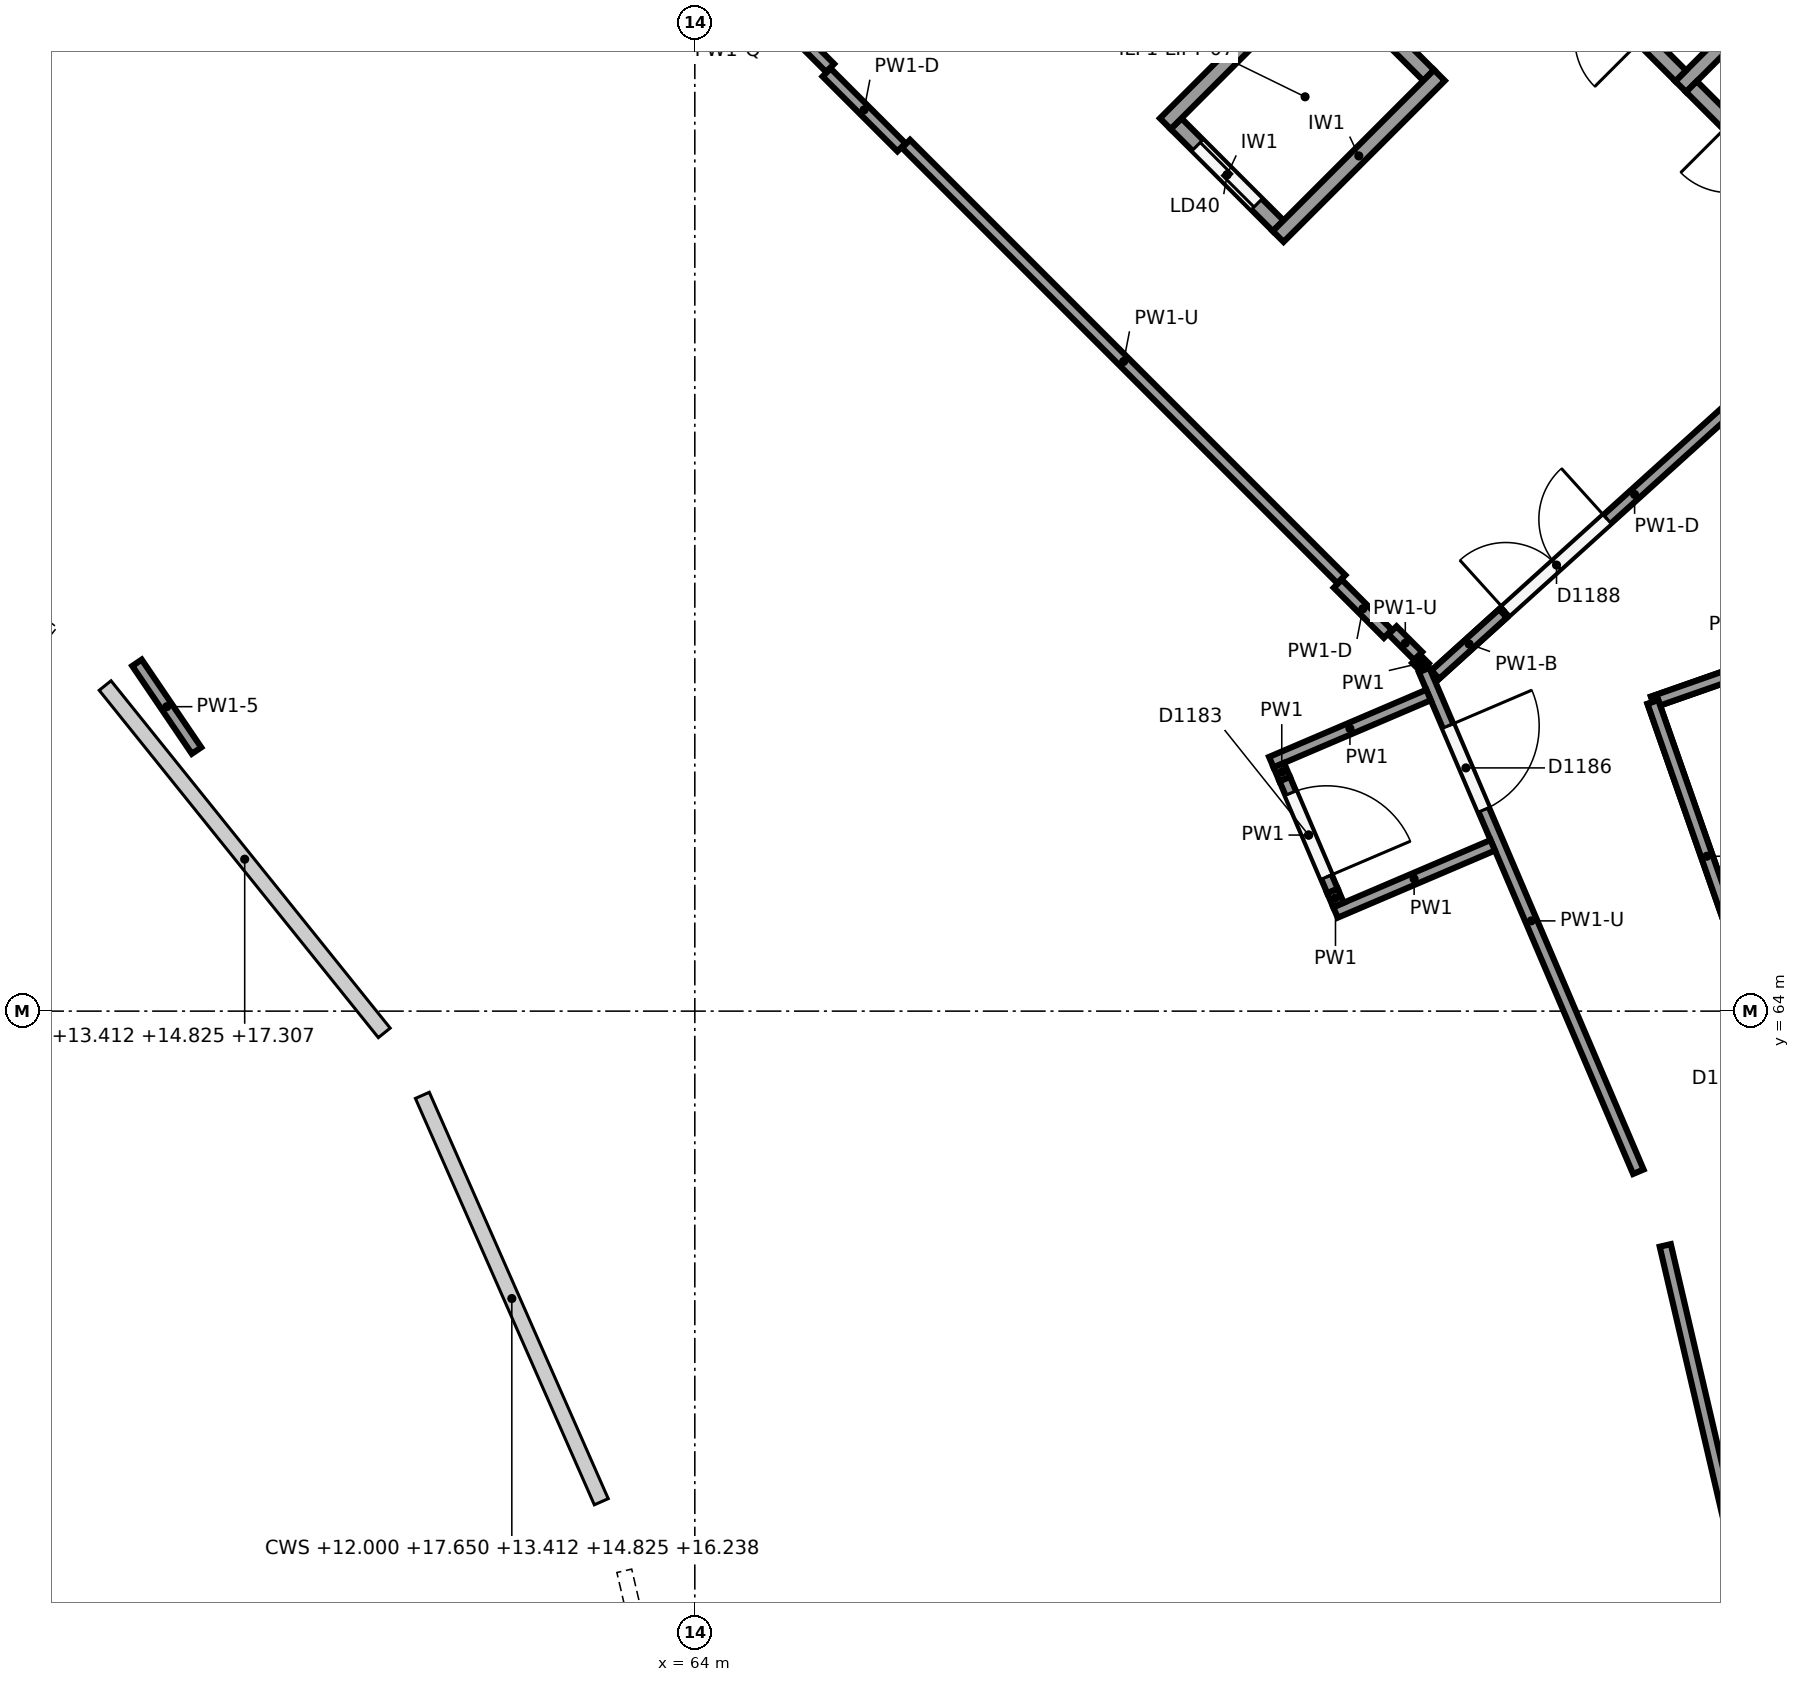
"""IFC4 building model, lengths in metres.
Left out: names, types, materials, properties, quantities, classifications, styles, units other than length and angle.
Written with IfcOpenShell. Run it as: python <this file> out.ifc"""

import sys

from ifc_helpers import new_model, si_unit, direction, frame, frame_2d, origin, origin_2d, place, context, subcontext, project, spatial, rectangle, circle, extrude, element, fill, save


model = new_model("IFC4")
c1 = context("Model", 3, precision=1e-05, world=origin(), true_north=direction((0.0, 1.0)))
c2 = subcontext(c1, "Body", "Model", "MODEL_VIEW")
j1 = project(units=[si_unit("LENGTHUNIT", "METRE"), si_unit("PLANEANGLEUNIT", "RADIAN")], contexts=[c1])
p1 = place(None, origin())
s1 = spatial("IfcSite", under=j1, at=p1, CompositionType="ELEMENT")
p2 = place(p1, origin())
s2 = spatial("IfcBuilding", under=s1, at=p2, CompositionType="ELEMENT")
p3 = place(p2, frame((0.0, 0.0, 12.0)))
s3 = spatial("IfcBuildingStorey", under=s2, at=p3, CompositionType="ELEMENT", Elevation=12.0)
p4 = place(p3, frame((61.723, 56.716, 0.0), z_axis=(0.0, 0.0, 1.0), x_axis=(1.0, 0.0, 0.0)))
e1 = element("IfcColumn", 1, at=p4, inside=s3, PredefinedType="COLUMN", context=c2, shape_type="SweptSolid", body=[
    extrude(circle(Radius=0.45, at=origin_2d()), origin(), (0.0, 0.0, 1.0), 2.877),
])
p5 = place(p3, frame((62.964, 57.104, 0.0), z_axis=(0.0, 0.0, 1.0), x_axis=(1.0, 0.0, 0.0)))
e2 = element("IfcColumn", 2, at=p5, inside=s3, PredefinedType="COLUMN", context=c2, shape_type="SweptSolid", body=[
    extrude(circle(Radius=0.4, at=origin_2d()), origin(), (0.0, 0.0, 1.0), 4.305),
])
p6 = place(p3, frame((71.17, 59.677, 0.0), z_axis=(0.0, 0.0, 1.0), x_axis=(1.0, 0.0, 0.0)))
e3 = element("IfcColumn", 3, at=p6, inside=s3, PredefinedType="COLUMN", context=c2, shape_type="SweptSolid", body=[
    extrude(circle(Radius=0.45, at=origin_2d()), origin(), (0.0, 0.0, 1.0), 6.0),
])
p7 = place(p3, frame((59.049, 62.766, 0.0), z_axis=(0.0, 0.0, 1.0), x_axis=(1.0, 0.0, 0.0)))
e4 = element("IfcColumn", 4, at=p7, inside=s3, PredefinedType="COLUMN", context=c2, shape_type="SweptSolid", body=[
    extrude(circle(Radius=0.45, at=origin_2d()), origin(), (0.0, 0.0, 1.0), 3.132),
])
p8 = place(p3, frame((60.222, 63.331, 0.0), z_axis=(0.0, 0.0, 1.0), x_axis=(1.0, 0.0, 0.0)))
e5 = element("IfcColumn", 5, at=p8, inside=s3, PredefinedType="COLUMN", context=c2, shape_type="SweptSolid", body=[
    extrude(circle(Radius=0.4, at=origin_2d()), origin(), (0.0, 0.0, 1.0), 4.561),
])
p9 = place(p3, frame((67.972, 67.058, 0.0), z_axis=(0.0, 0.0, 1.0), x_axis=(1.0, 0.0, 0.0)))
e6 = element("IfcColumn", 6, at=p9, inside=s3, PredefinedType="COLUMN", context=c2, shape_type="SweptSolid", body=[
    extrude(circle(Radius=0.45, at=origin_2d()), origin(), (0.0, 0.0, 1.0), 6.0),
])
p10 = place(p3, frame((55.94, 68.658, 0.0), z_axis=(0.0, 0.0, 1.0), x_axis=(1.0, 0.0, 0.0)))
e7 = element("IfcColumn", 7, at=p10, inside=s3, PredefinedType="COLUMN", context=c2, shape_type="SweptSolid", body=[
    extrude(circle(Radius=0.4, at=origin_2d()), origin(), (0.0, 0.0, 1.0), 4.729),
])
p11 = place(p3, frame((63.068, 73.47, 0.0), z_axis=(0.0, 0.0, 1.0), x_axis=(1.0, 0.0, 0.0)))
e8 = element("IfcColumn", 8, at=p11, inside=s3, PredefinedType="COLUMN", context=c2, shape_type="SweptSolid", body=[
    extrude(circle(Radius=0.45, at=origin_2d()), origin(), (0.0, 0.0, 1.0), 6.0),
])
p12 = place(p3, frame((78.173, 77.365, 0.0), z_axis=(0.0, 0.0, 1.0), x_axis=(-0.707178586901, -0.707034968179, 0.0)))
e9 = element("IfcWall", 9, at=p12, inside=s3, PredefinedType="SHEAR", context=c2, shape_type="SweptSolid", body=[
    extrude(rectangle(XDim=1.7, YDim=0.2, at=frame_2d((0.85, 0.0))), origin(), (0.0, 0.0, 1.0), 5.65),
])
p13 = place(p3, frame((79.375, 73.9, 0.0), z_axis=(0.0, 0.0, 1.0), x_axis=(-0.707068634461, 0.707144925854, 0.0)))
e10 = element("IfcWall", 10, at=p13, inside=s3, PredefinedType="SHEAR", context=c2, shape_type="SweptSolid", body=[
    extrude(rectangle(XDim=3.2, YDim=0.2, at=frame_2d((1.6, 0.0))), origin(), (0.0, 0.0, 1.0), 5.65),
])
p14 = place(p13, frame((0.7, 0.0, 0.0)))
e11 = element("IfcOpeningElement", 11, at=p14, cuts=e10, PredefinedType="OPENING", context=c2, shape_type="SweptSolid", body=[
    extrude(rectangle(XDim=1.8, YDim=2.1, at=frame_2d((0.9, 1.05))), frame((0.0, 0.11, 0.0), z_axis=(0.0, -1.0, 0.0), x_axis=(1.0, 0.0, 0.0)), (0.0, 0.0, 1.0), 0.22),
])
p15 = place(p3, frame((76.971, 76.304, 0.0), z_axis=(0.0, 0.0, 1.0), x_axis=(-0.707106781187, 0.707106781187, 0.0)))
e12 = element("IfcWall", 12, at=p15, inside=s3, PredefinedType="SHEAR", context=c2, shape_type="SweptSolid", body=[
    extrude(rectangle(XDim=3.2, YDim=0.2, at=frame_2d((1.6, 0.0))), origin(), (0.0, 0.0, 1.0), 5.65),
])
p16 = place(p15, frame((0.7, 0.0, 0.0)))
e13 = element("IfcOpeningElement", 13, at=p16, cuts=e12, PredefinedType="OPENING", context=c2, shape_type="SweptSolid", body=[
    extrude(rectangle(XDim=1.8, YDim=2.1, at=frame_2d((0.9, 1.05))), frame((0.0, 0.11, 0.0), z_axis=(0.0, -1.0, 0.0), x_axis=(1.0, 0.0, 0.0)), (0.0, 0.0, 1.0), 0.22),
])
for number, where, z_axis, x_axis in (
    (14, (73.797, 76.312, 0.0), (0.0, 0.0, 1.0), (-0.707, -0.707, 0.0)),
    (15, (72.312, 77.797, 0.0), (0.0, 0.0, 1.0), (-0.707, -0.707, 0.0)),
):
    element("IfcWall", number, at=place(p3, frame(where, z_axis=z_axis, x_axis=x_axis)), inside=s3, PredefinedType="SHEAR", context=c2, shape_type="SweptSolid", body=[
        extrude(rectangle(XDim=3.0, YDim=0.2, at=frame_2d((1.5, 0.0))), origin(), (0.0, 0.0, 1.0), 5.65),
    ])
p17 = place(p3, frame((73.656, 76.312, 0.0), z_axis=(0.0, 0.0, 1.0), x_axis=(-0.707106781187, 0.707106781187, 0.0)))
e16 = element("IfcWall", 16, at=p17, inside=s3, PredefinedType="SHEAR", context=c2, shape_type="SweptSolid", body=[
    extrude(rectangle(XDim=1.9, YDim=0.2, at=frame_2d((0.95, 0.0))), origin(), (0.0, 0.0, 1.0), 5.65),
])
p18 = place(p3, frame((71.676, 74.332, 0.0), z_axis=(0.0, 0.0, 1.0), x_axis=(-0.707106781187, 0.707106781187, 0.0)))
e17 = element("IfcWall", 17, at=p18, inside=s3, PredefinedType="SHEAR", context=c2, shape_type="SweptSolid", body=[
    extrude(rectangle(XDim=1.9, YDim=0.2, at=frame_2d((0.95, 0.0))), origin(), (0.0, 0.0, 1.0), 5.65),
])
p19 = place(p18, frame((0.4, 0.0, 0.0)))
e18 = element("IfcOpeningElement", 18, at=p19, cuts=e17, PredefinedType="OPENING", context=c2, shape_type="SweptSolid", body=[
    extrude(rectangle(XDim=1.1, YDim=2.1, at=frame_2d((0.55, 1.05))), frame((0.0, 0.11, 0.0), z_axis=(0.0, -1.0, 0.0), x_axis=(1.0, 0.0, 0.0)), (0.0, 0.0, 1.0), 0.22),
])
p20 = place(p3, frame((76.768, 60.918, 0.0), z_axis=(0.0, 0.0, 1.0), x_axis=(0.226944673482, -0.973907652284, 0.0)))
e19 = element("IfcWall", 19, at=p20, inside=s3, PredefinedType="PARTITIONING", context=c2, shape_type="SweptSolid", body=[
    extrude(rectangle(XDim=7.882, YDim=0.15, at=frame_2d((3.941, 0.0))), origin(), (0.0, 0.0, 1.0), 3.962),
])
p21 = place(p3, frame((57.444, 67.427, 0.0), z_axis=(0.0, 0.0, 1.0), x_axis=(-0.56118064085, 0.827693354048, 0.0)))
e20 = element("IfcWall", 20, at=p21, inside=s3, PredefinedType="PARTITIONING", context=c2, shape_type="SweptSolid", body=[
    extrude(rectangle(XDim=1.396, YDim=0.15, at=frame_2d((0.698, 0.0))), origin(), (0.0, 0.0, 1.0), 4.156),
])
p22 = place(p3, frame((66.779, 75.41, 0.0), z_axis=(0.0, 0.0, 1.0), x_axis=(0.707091708943, -0.707121853109, 0.0)))
e21 = element("IfcWall", 21, at=p22, inside=s3, PredefinedType="PARTITIONING", context=c2, shape_type="SweptSolid", body=[
    extrude(rectangle(XDim=8.099, YDim=0.15, at=frame_2d((4.05, 0.0))), origin(), (0.0, 0.0, 1.0), 4.187),
])
p23 = place(p3, frame((73.179, 69.01, 0.0), z_axis=(0.0, 0.0, 1.0), x_axis=(0.707106781187, -0.707106781187, 0.0)))
e22 = element("IfcWall", 22, at=p23, inside=s3, PredefinedType="PARTITIONING", context=c2, shape_type="SweptSolid", body=[
    extrude(rectangle(XDim=0.477, YDim=0.15, at=frame_2d((0.238, 0.0))), origin(), (0.0, 0.0, 1.0), 4.187),
])
p24 = place(p3, frame((73.595, 68.488, 0.0), z_axis=(0.0, 0.0, 1.0), x_axis=(0.392716080943, -0.919659763047, 0.0)))
e23 = element("IfcWall", 23, at=p24, inside=s3, PredefinedType="PARTITIONING", context=c2, shape_type="SweptSolid", body=[
    extrude(rectangle(XDim=7.177, YDim=0.15, at=frame_2d((3.589, 0.0))), origin(), (0.0, 0.0, 1.0), 4.187),
])
p25 = place(p24, frame((0.8, 0.0, 0.0)))
e24 = element("IfcOpeningElement", 24, at=p25, cuts=e23, PredefinedType="OPENING", context=c2, shape_type="SweptSolid", body=[
    extrude(rectangle(XDim=1.2, YDim=2.1, at=frame_2d((0.6, 1.05))), frame((0.0, 0.085, 0.0), z_axis=(0.0, -1.0, 0.0), x_axis=(1.0, 0.0, 0.0)), (0.0, 0.0, 1.0), 0.17),
])
p26 = place(p3, frame((64.216, 77.973, 0.0), z_axis=(0.0, 0.0, 1.0), x_axis=(0.707161957089, -0.707051600978, 0.0)))
e25 = element("IfcWall", 25, at=p26, inside=s3, PredefinedType="PARTITIONING", context=c2, shape_type="SweptSolid", body=[
    extrude(rectangle(XDim=2.212, YDim=0.15, at=frame_2d((1.106, 0.0))), origin(), (0.0, 0.0, 1.0), 4.118),
])
p27 = place(p3, frame((82.677, 70.192, 0.0), z_axis=(0.0, 0.0, 1.0), x_axis=(-0.943884385731, -0.330276045715, 0.0)))
e26 = element("IfcWall", 26, at=p27, inside=s3, PredefinedType="PARTITIONING", context=c2, shape_type="SweptSolid", body=[
    extrude(rectangle(XDim=6.433, YDim=0.15, at=frame_2d((3.217, 0.0))), origin(), (0.0, 0.0, 1.0), 4.75),
])
p28 = place(p27, frame((0.75, 0.0, 0.0)))
e27 = element("IfcOpeningElement", 27, at=p28, cuts=e26, PredefinedType="OPENING", context=c2, shape_type="SweptSolid", body=[
    extrude(rectangle(XDim=1.8, YDim=2.1, at=frame_2d((0.9, 1.05))), frame((0.0, 0.085, 0.0), z_axis=(0.0, -1.0, 0.0), x_axis=(1.0, 0.0, 0.0)), (0.0, 0.0, 1.0), 0.17),
])
p29 = place(p3, frame((78.941, 68.884, 4.75), z_axis=(0.0, 0.0, 1.0), x_axis=(-0.943892194222, -0.330253729256, 0.0)))
e28 = element("IfcWall", 28, at=p29, inside=s3, PredefinedType="PARTITIONING", context=c2, shape_type="SweptSolid", body=[
    extrude(rectangle(XDim=2.474, YDim=0.15, at=frame_2d((1.237, 0.0))), origin(), (0.0, 0.0, 1.0), 0.9),
])
p30 = place(p3, frame((76.605, 68.067, 0.0), z_axis=(0.0, 0.0, 1.0), x_axis=(0.330282309563, -0.943882193915, 0.0)))
e29 = element("IfcWall", 29, at=p30, inside=s3, PredefinedType="PARTITIONING", context=c2, shape_type="SweptSolid", body=[
    extrude(rectangle(XDim=13.89, YDim=0.15, at=frame_2d((6.945, 0.0))), origin(), (0.0, 0.0, 1.0), 4.55),
])
p31 = place(p30, frame((4.35, 0.0, 0.0)))
e30 = element("IfcOpeningElement", 30, at=p31, cuts=e29, PredefinedType="OPENING", context=c2, shape_type="SweptSolid", body=[
    extrude(rectangle(XDim=1.8, YDim=2.1, at=frame_2d((0.9, 1.05))), frame((0.0, 0.085, 0.0), z_axis=(0.0, -1.0, 0.0), x_axis=(1.0, 0.0, 0.0)), (0.0, 0.0, 1.0), 0.17),
])
p32 = place(p3, frame((76.605, 68.067, 4.55), z_axis=(0.0, 0.0, 1.0), x_axis=(0.330261909448, -0.943889332055, 0.0)))
e31 = element("IfcWall", 31, at=p32, inside=s3, PredefinedType="PARTITIONING", context=c2, shape_type="SweptSolid", body=[
    extrude(rectangle(XDim=4.3, YDim=0.15, at=frame_2d((2.15, 0.0))), origin(), (0.0, 0.0, 1.0), 1.1),
])
p33 = place(p3, frame((65.734, 76.349, 0.0), z_axis=(0.0, 0.0, 1.0), x_axis=(0.707106781187, -0.707106781187, 0.0)))
e32 = element("IfcWall", 32, at=p33, inside=s3, PredefinedType="PARTITIONING", context=c2, shape_type="SweptSolid", body=[
    extrude(rectangle(XDim=1.393, YDim=0.15, at=frame_2d((0.696, 0.0))), origin(), (0.0, 0.0, 1.0), 4.55),
])
p34 = place(p3, frame((72.46, 69.623, 0.0), z_axis=(0.0, 0.0, 1.0), x_axis=(0.707106781187, -0.707106781187, 0.0)))
e33 = element("IfcWall", 33, at=p34, inside=s3, PredefinedType="PARTITIONING", context=c2, shape_type="SweptSolid", body=[
    extrude(rectangle(XDim=0.933, YDim=0.15, at=frame_2d((0.466, 0.0))), origin(), (0.0, 0.0, 1.0), 4.55),
])
p35 = place(p3, frame((73.492, 68.634, 0.0), z_axis=(0.0, 0.0, 1.0), x_axis=(0.706331870343, -0.707880843743, 0.0)))
e34 = element("IfcWall", 34, at=p35, inside=s3, PredefinedType="PARTITIONING", context=c2, shape_type="SweptSolid", body=[
    extrude(rectangle(XDim=0.158, YDim=0.15, at=frame_2d((0.079, 0.0))), origin(), (0.0, 0.0, 1.0), 5.65),
])
p36 = place(p3, frame((73.742, 68.427, 0.0), z_axis=(0.0, 0.0, 1.0), x_axis=(0.741827757785, 0.670590469496, 0.0)))
e35 = element("IfcWall", 35, at=p36, inside=s3, PredefinedType="PARTITIONING", context=c2, shape_type="SweptSolid", body=[
    extrude(rectangle(XDim=7.07, YDim=0.15, at=frame_2d((3.535, 0.0))), origin(), (0.0, 0.0, 1.0), 4.55),
])
p37 = place(p36, frame((1.25, 0.0, 0.0)))
e36 = element("IfcOpeningElement", 36, at=p37, cuts=e35, PredefinedType="OPENING", context=c2, shape_type="SweptSolid", body=[
    extrude(rectangle(XDim=1.8, YDim=2.1, at=frame_2d((0.9, 1.05))), frame((0.0, 0.085, 0.0), z_axis=(0.0, -1.0, 0.0), x_axis=(1.0, 0.0, 0.0)), (0.0, 0.0, 1.0), 0.17),
])
p38 = place(p3, frame((73.742, 68.427, 4.55), z_axis=(0.0, 0.0, 1.0), x_axis=(0.741906759341, 0.670503065201, 0.0)))
e37 = element("IfcWall", 37, at=p38, inside=s3, PredefinedType="PARTITIONING", context=c2, shape_type="SweptSolid", body=[
    extrude(rectangle(XDim=1.2, YDim=0.15, at=frame_2d((0.6, 0.0))), origin(), (0.0, 0.0, 1.0), 1.1),
])
p39 = place(p3, frame((73.654, 68.159, 0.0), z_axis=(0.0, 0.0, 1.0), x_axis=(-0.919638165537, -0.392766653993, 0.0)))
e38 = element("IfcWall", 38, at=p39, inside=s3, PredefinedType="PARTITIONING", context=c2, shape_type="SweptSolid", body=[
    extrude(rectangle(XDim=2.25, YDim=0.15, at=frame_2d((1.125, 0.0))), origin(), (0.0, 0.0, 1.0), 5.65),
])
p40 = place(p3, frame((74.498, 66.182, 0.0), z_axis=(0.0, 0.0, 1.0), x_axis=(-0.919660619765, -0.392714074682, 0.0)))
e39 = element("IfcWall", 39, at=p40, inside=s3, PredefinedType="PARTITIONING", context=c2, shape_type="SweptSolid", body=[
    extrude(rectangle(XDim=2.25, YDim=0.15, at=frame_2d((1.125, 0.0))), origin(), (0.0, 0.0, 1.0), 5.65),
])
p41 = place(p3, frame((71.683, 67.236, 0.0), z_axis=(0.0, 0.0, 1.0), x_axis=(0.391709037985, -0.920089142182, 0.0)))
e40 = element("IfcWall", 40, at=p41, inside=s3, PredefinedType="PARTITIONING", context=c2, shape_type="SweptSolid", body=[
    extrude(rectangle(XDim=0.2, YDim=0.15, at=frame_2d((0.1, 0.0))), origin(), (0.0, 0.0, 1.0), 5.65),
])
p42 = place(p3, frame((71.762, 67.052, 0.0), z_axis=(0.0, 0.0, 1.0), x_axis=(0.392758797822, -0.919641520775, 0.0)))
e41 = element("IfcWall", 41, at=p42, inside=s3, PredefinedType="PARTITIONING", context=c2, shape_type="SweptSolid", body=[
    extrude(rectangle(XDim=1.6, YDim=0.15, at=frame_2d((0.8, 0.0))), origin(), (0.0, 0.0, 1.0), 5.65),
])
p43 = place(p42, frame((0.2, 0.0, 0.0)))
e42 = element("IfcOpeningElement", 42, at=p43, cuts=e41, PredefinedType="OPENING", context=c2, shape_type="SweptSolid", body=[
    extrude(rectangle(XDim=1.2, YDim=2.1, at=frame_2d((0.6, 1.05))), frame((0.0, 0.085, 0.0), z_axis=(0.0, -1.0, 0.0), x_axis=(1.0, 0.0, 0.0)), (0.0, 0.0, 1.0), 0.17),
])
p44 = place(p3, frame((72.39, 65.581, 0.0), z_axis=(0.0, 0.0, 1.0), x_axis=(0.393182323567, -0.91946052685, 0.0)))
e43 = element("IfcWall", 43, at=p44, inside=s3, PredefinedType="PARTITIONING", context=c2, shape_type="SweptSolid", body=[
    extrude(rectangle(XDim=0.2, YDim=0.15, at=frame_2d((0.1, 0.0))), origin(), (0.0, 0.0, 1.0), 5.65),
])
p45 = place(p19, origin())
e44 = element("IfcDoor", 44, at=p45, inside=s3, OperationType="SLIDING_TO_RIGHT", PredefinedType="DOOR", context=c2, shape_type="SweptSolid", body=[
    extrude(rectangle(XDim=1.1, YDim=2.1, at=frame_2d((0.55, 1.05))), frame((0.0, 0.025, 0.0), z_axis=(0.0, -1.0, 0.0), x_axis=(1.0, 0.0, 0.0)), (0.0, 0.0, 1.0), 0.05),
])
fill(e18, e44)
p46 = place(p25, origin())
e45 = element("IfcDoor", 45, at=p46, inside=s3, OperationType="SINGLE_SWING_LEFT", PredefinedType="DOOR", context=c2, shape_type="SweptSolid", body=[
    extrude(rectangle(XDim=1.2, YDim=2.1, at=frame_2d((0.6, 1.05))), frame((0.0, 0.025, 0.0), z_axis=(0.0, -1.0, 0.0), x_axis=(1.0, 0.0, 0.0)), (0.0, 0.0, 1.0), 0.05),
])
fill(e24, e45)
p47 = place(p37, origin())
e46 = element("IfcDoor", 46, at=p47, inside=s3, OperationType="DOUBLE_DOOR_SINGLE_SWING", PredefinedType="DOOR", context=c2, shape_type="SweptSolid", body=[
    extrude(rectangle(XDim=1.8, YDim=2.1, at=frame_2d((0.9, 1.05))), frame((0.0, 0.025, 0.0), z_axis=(0.0, -1.0, 0.0), x_axis=(1.0, 0.0, 0.0)), (0.0, 0.0, 1.0), 0.05),
])
fill(e36, e46)
p48 = place(p43, origin())
e47 = element("IfcDoor", 47, at=p48, inside=s3, OperationType="SINGLE_SWING_RIGHT", PredefinedType="DOOR", context=c2, shape_type="SweptSolid", body=[
    extrude(rectangle(XDim=1.2, YDim=2.1, at=frame_2d((0.6, 1.05))), frame((0.0, 0.025, 0.0), z_axis=(0.0, -1.0, 0.0), x_axis=(1.0, 0.0, 0.0)), (0.0, 0.0, 1.0), 0.05),
])
fill(e42, e47)
save(model, sys.argv[1])
